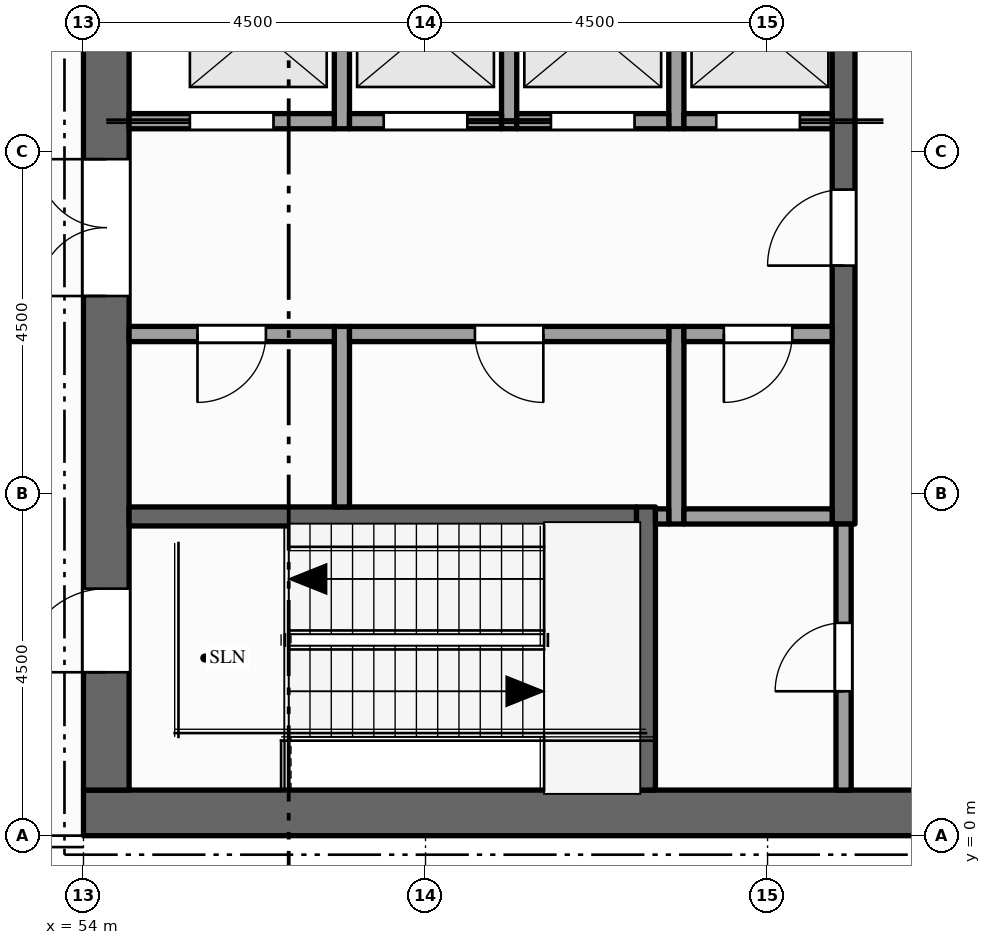
"""IFC4 building model, lengths in metres.
Left out: names, types, materials, properties, quantities, classifications, styles, units other than length and angle.
Written with IfcOpenShell. Run it as: python <this file> out.ifc"""

import sys

from ifc_helpers import new_model, si_unit, direction, frame, frame_2d, origin, place, context, subcontext, project, spatial, rectangle, extrude, element, fill, save


model = new_model("IFC4")
c1 = context("Model", 3, precision=1e-05, world=origin(), true_north=direction((0.0, 1.0)))
c2 = subcontext(c1, "Body", "Model", "MODEL_VIEW")
j1 = project(units=[si_unit("LENGTHUNIT", "METRE"), si_unit("PLANEANGLEUNIT", "RADIAN")], contexts=[c1])
p1 = place(None, origin())
s1 = spatial("IfcSite", under=j1, at=p1, CompositionType="ELEMENT")
p2 = place(p1, origin())
s2 = spatial("IfcBuilding", under=s1, at=p2, CompositionType="ELEMENT")
p3 = place(p2, frame((0.0, 0.0, 318.5)))
s3 = spatial("IfcBuildingStorey", under=s2, at=p3, CompositionType="ELEMENT", Elevation=318.5)
p4 = place(p3, frame((67.5, 0.3, -0.15), z_axis=(0.0, 0.0, 1.0), x_axis=(-1.0, 0.0, 0.0)))
e1 = element("IfcWall", 1, at=p4, inside=s3, PredefinedType="SHEAR", context=c2, shape_type="SweptSolid", body=[
    extrude(rectangle(XDim=13.5, YDim=0.6, at=frame_2d((6.75, 0.0))), origin(), (0.0, 0.0, 1.0), 4.5),
])
p5 = place(p3, frame((54.3, 0.6, -0.15), z_axis=(0.0, 0.0, 1.0), x_axis=(0.0, 1.0, 0.0)))
e2 = element("IfcWall", 2, at=p5, inside=s3, PredefinedType="SHEAR", context=c2, shape_type="SweptSolid", body=[
    extrude(rectangle(XDim=21.3, YDim=0.6, at=frame_2d((10.65, 0.0))), origin(), (0.0, 0.0, 1.0), 4.5),
])
p6 = place(p5, frame((6.5, 0.0, 0.15)))
e3 = element("IfcOpeningElement", 3, at=p6, cuts=e2, PredefinedType="OPENING", context=c2, shape_type="SweptSolid", body=[
    extrude(rectangle(XDim=1.8, YDim=2.1, at=frame_2d((0.9, 1.05))), frame((0.0, 0.31, 0.0), z_axis=(0.0, -1.0, 0.0), x_axis=(1.0, 0.0, 0.0)), (0.0, 0.0, 1.0), 0.62),
])
p7 = place(p5, frame((12.55, 0.0, 0.15)))
e4 = element("IfcOpeningElement", 4, at=p7, cuts=e2, PredefinedType="OPENING", context=c2, shape_type="SweptSolid", body=[
    extrude(rectangle(XDim=1.1, YDim=2.1, at=frame_2d((0.55, 1.05))), frame((0.0, 0.31, 0.0), z_axis=(0.0, -1.0, 0.0), x_axis=(1.0, 0.0, 0.0)), (0.0, 0.0, 1.0), 0.62),
])
p8 = place(p5, frame((1.55, 0.0, 0.15)))
e5 = element("IfcOpeningElement", 5, at=p8, cuts=e2, PredefinedType="OPENING", context=c2, shape_type="SweptSolid", body=[
    extrude(rectangle(XDim=1.1, YDim=2.1, at=frame_2d((0.55, 1.05))), frame((0.0, 0.31, 0.0), z_axis=(0.0, -1.0, 0.0), x_axis=(1.0, 0.0, 0.0)), (0.0, 0.0, 1.0), 0.62),
])
p9 = place(p5, frame((18.75, 0.0, 0.15)))
e6 = element("IfcOpeningElement", 6, at=p9, cuts=e2, PredefinedType="OPENING", context=c2, shape_type="SweptSolid", body=[
    extrude(rectangle(XDim=1.1, YDim=2.1, at=frame_2d((0.55, 1.05))), frame((0.0, 0.31, 0.0), z_axis=(0.0, -1.0, 0.0), x_axis=(1.0, 0.0, 0.0)), (0.0, 0.0, 1.0), 0.62),
])
p10 = place(p3, frame((57.4, 4.325, 0.0), z_axis=(0.0, 0.0, 1.0), x_axis=(0.0, 1.0, 0.0)))
e7 = element("IfcWall", 7, at=p10, inside=s3, PredefinedType="PARTITIONING", context=c2, shape_type="SweptSolid", body=[
    extrude(rectangle(XDim=2.375, YDim=0.2, at=frame_2d((1.188, 0.0))), origin(), (0.0, 0.0, 1.0), 4.35),
])
for number, where, z_axis, x_axis in (
    (8, (57.4, 9.3, 0.0), (0.0, 0.0, 1.0), (0.0, 1.0, 0.0)),
    (9, (59.6, 9.3, 0.0), (0.0, 0.0, 1.0), (0.0, 1.0, 0.0)),
):
    element("IfcWall", number, at=place(p3, frame(where, z_axis=z_axis, x_axis=x_axis)), inside=s3, PredefinedType="SOLIDWALL", context=c2, shape_type="SweptSolid", body=[
        extrude(rectangle(XDim=2.6, YDim=0.2, at=frame_2d((1.3, 0.0))), origin(), (0.0, 0.0, 1.0), 4.35),
    ])
p11 = place(p3, frame((61.4, 0.6, 0.0), z_axis=(0.0, 0.0, 1.0), x_axis=(0.0, 1.0, 0.0)))
e10 = element("IfcWall", 10, at=p11, inside=s3, PredefinedType="SHEAR", context=c2, shape_type="SweptSolid", body=[
    extrude(rectangle(XDim=3.725, YDim=0.25, at=frame_2d((1.862, 0.0))), origin(), (0.0, 0.0, 1.0), 4.35),
])
p12 = place(p3, frame((61.8, 4.1, 0.0), z_axis=(0.0, 0.0, 1.0), x_axis=(0.0, 1.0, 0.0)))
e11 = element("IfcWall", 11, at=p12, inside=s3, PredefinedType="PARTITIONING", context=c2, shape_type="SweptSolid", body=[
    extrude(rectangle(XDim=2.6, YDim=0.2, at=frame_2d((1.3, 0.0))), origin(), (0.0, 0.0, 1.0), 4.35),
])
p13 = place(p3, frame((61.8, 9.3, 0.0), z_axis=(0.0, 0.0, 1.0), x_axis=(0.0, 1.0, 0.0)))
e12 = element("IfcWall", 12, at=p13, inside=s3, PredefinedType="SOLIDWALL", context=c2, shape_type="SweptSolid", body=[
    extrude(rectangle(XDim=2.6, YDim=0.2, at=frame_2d((1.3, 0.0))), origin(), (0.0, 0.0, 1.0), 4.35),
])
p14 = place(p3, frame((64.0, 0.6, 0.0), z_axis=(0.0, 0.0, 1.0), x_axis=(0.0, 1.0, 0.0)))
e13 = element("IfcWall", 13, at=p14, inside=s3, PredefinedType="PARTITIONING", context=c2, shape_type="SweptSolid", body=[
    extrude(rectangle(XDim=3.5, YDim=0.2, at=frame_2d((1.75, 0.0))), origin(), (0.0, 0.0, 1.0), 4.35),
])
p15 = place(p14, frame((1.3, 0.0, 0.0)))
e14 = element("IfcOpeningElement", 14, at=p15, cuts=e13, PredefinedType="OPENING", context=c2, shape_type="SweptSolid", body=[
    extrude(rectangle(XDim=0.9, YDim=2.1, at=frame_2d((0.45, 1.05))), frame((0.0, 0.11, 0.0), z_axis=(0.0, -1.0, 0.0), x_axis=(1.0, 0.0, 0.0)), (0.0, 0.0, 1.0), 0.22),
])
p16 = place(p3, frame((64.0, 4.1, 0.0), z_axis=(0.0, 0.0, 1.0), x_axis=(0.0, 1.0, 0.0)))
e15 = element("IfcWall", 15, at=p16, inside=s3, PredefinedType="SHEAR", context=c2, shape_type="SweptSolid", body=[
    extrude(rectangle(XDim=14.5, YDim=0.3, at=frame_2d((7.25, 0.0))), origin(), (0.0, 0.0, 1.0), 4.35),
])
p17 = place(p16, frame((3.4, 0.0, 0.0)))
e16 = element("IfcOpeningElement", 16, at=p17, cuts=e15, PredefinedType="OPENING", context=c2, shape_type="SweptSolid", body=[
    extrude(rectangle(XDim=1.0, YDim=2.1, at=frame_2d((0.5, 1.05))), frame((0.0, 0.16, 0.0), z_axis=(0.0, -1.0, 0.0), x_axis=(1.0, 0.0, 0.0)), (0.0, 0.0, 1.0), 0.32),
])
p18 = place(p16, frame((9.1, 0.0, 0.0)))
e17 = element("IfcOpeningElement", 17, at=p18, cuts=e15, PredefinedType="OPENING", context=c2, shape_type="SweptSolid", body=[
    extrude(rectangle(XDim=1.0, YDim=2.1, at=frame_2d((0.5, 1.05))), frame((0.0, 0.16, 0.0), z_axis=(0.0, -1.0, 0.0), x_axis=(1.0, 0.0, 0.0)), (0.0, 0.0, 1.0), 0.32),
])
p19 = place(p3, frame((54.6, 4.2, 0.0), z_axis=(0.0, 0.0, 1.0), x_axis=(1.0, 0.0, 0.0)))
e18 = element("IfcWall", 18, at=p19, inside=s3, PredefinedType="SHEAR", context=c2, shape_type="SweptSolid", body=[
    extrude(rectangle(XDim=6.675, YDim=0.25, at=frame_2d((3.337, 0.0))), origin(), (0.0, 0.0, 1.0), 4.35),
])
p20 = place(p3, frame((61.525, 4.2, 0.0), z_axis=(0.0, 0.0, 1.0), x_axis=(1.0, 0.0, 0.0)))
e19 = element("IfcWall", 19, at=p20, inside=s3, PredefinedType="PARTITIONING", context=c2, shape_type="SweptSolid", body=[
    extrude(rectangle(XDim=0.175, YDim=0.2, at=frame_2d((0.087, 0.0))), origin(), (0.0, 0.0, 1.0), 4.35),
])
p21 = place(p3, frame((61.9, 4.2, 0.0), z_axis=(0.0, 0.0, 1.0), x_axis=(1.0, 0.0, 0.0)))
e20 = element("IfcWall", 20, at=p21, inside=s3, PredefinedType="PARTITIONING", context=c2, shape_type="SweptSolid", body=[
    extrude(rectangle(XDim=1.95, YDim=0.2, at=frame_2d((0.975, 0.0))), origin(), (0.0, 0.0, 1.0), 4.35),
])
p22 = place(p3, frame((54.6, 6.6, 0.0), z_axis=(0.0, 0.0, 1.0), x_axis=(1.0, 0.0, 0.0)))
e21 = element("IfcWall", 21, at=p22, inside=s3, PredefinedType="PARTITIONING", context=c2, shape_type="SweptSolid", body=[
    extrude(rectangle(XDim=2.7, YDim=0.2, at=frame_2d((1.35, 0.0))), origin(), (0.0, 0.0, 1.0), 4.35),
])
p23 = place(p22, frame((0.9, 0.0, 0.0)))
e22 = element("IfcOpeningElement", 22, at=p23, cuts=e21, PredefinedType="OPENING", context=c2, shape_type="SweptSolid", body=[
    extrude(rectangle(XDim=0.9, YDim=2.1, at=frame_2d((0.45, 1.05))), frame((0.0, 0.11, 0.0), z_axis=(0.0, -1.0, 0.0), x_axis=(1.0, 0.0, 0.0)), (0.0, 0.0, 1.0), 0.22),
])
p24 = place(p3, frame((57.5, 6.6, 0.0), z_axis=(0.0, 0.0, 1.0), x_axis=(1.0, 0.0, 0.0)))
e23 = element("IfcWall", 23, at=p24, inside=s3, PredefinedType="PARTITIONING", context=c2, shape_type="SweptSolid", body=[
    extrude(rectangle(XDim=4.2, YDim=0.2, at=frame_2d((2.1, 0.0))), origin(), (0.0, 0.0, 1.0), 4.35),
])
p25 = place(p24, frame((1.65, 0.0, 0.0)))
e24 = element("IfcOpeningElement", 24, at=p25, cuts=e23, PredefinedType="OPENING", context=c2, shape_type="SweptSolid", body=[
    extrude(rectangle(XDim=0.9, YDim=2.1, at=frame_2d((0.45, 1.05))), frame((0.0, 0.11, 0.0), z_axis=(0.0, -1.0, 0.0), x_axis=(1.0, 0.0, 0.0)), (0.0, 0.0, 1.0), 0.22),
])
p26 = place(p3, frame((61.9, 6.6, 0.0), z_axis=(0.0, 0.0, 1.0), x_axis=(1.0, 0.0, 0.0)))
e25 = element("IfcWall", 25, at=p26, inside=s3, PredefinedType="PARTITIONING", context=c2, shape_type="SweptSolid", body=[
    extrude(rectangle(XDim=1.95, YDim=0.2, at=frame_2d((0.975, 0.0))), origin(), (0.0, 0.0, 1.0), 4.35),
])
p27 = place(p26, frame((0.525, 0.0, 0.0)))
e26 = element("IfcOpeningElement", 26, at=p27, cuts=e25, PredefinedType="OPENING", context=c2, shape_type="SweptSolid", body=[
    extrude(rectangle(XDim=0.9, YDim=2.1, at=frame_2d((0.45, 1.05))), frame((0.0, 0.11, 0.0), z_axis=(0.0, -1.0, 0.0), x_axis=(1.0, 0.0, 0.0)), (0.0, 0.0, 1.0), 0.22),
])
p28 = place(p3, frame((54.6, 9.4, 0.0), z_axis=(0.0, 0.0, 1.0), x_axis=(1.0, 0.0, 0.0)))
e27 = element("IfcWall", 27, at=p28, inside=s3, PredefinedType="SOLIDWALL", context=c2, shape_type="SweptSolid", body=[
    extrude(rectangle(XDim=2.7, YDim=0.2, at=frame_2d((1.35, 0.0))), origin(), (0.0, 0.0, 1.0), 4.35),
])
p29 = place(p28, frame((0.8, 0.0, 0.012)))
e28 = element("IfcOpeningElement", 28, at=p29, cuts=e27, PredefinedType="OPENING", context=c2, shape_type="SweptSolid", body=[
    extrude(rectangle(XDim=1.1, YDim=2.1, at=frame_2d((0.55, 1.05))), frame((0.0, 0.11, 0.0), z_axis=(0.0, -1.0, 0.0), x_axis=(1.0, 0.0, 0.0)), (0.0, 0.0, 1.0), 0.22),
])
p30 = place(p3, frame((57.5, 9.4, 0.0), z_axis=(0.0, 0.0, 1.0), x_axis=(1.0, 0.0, 0.0)))
e29 = element("IfcWall", 29, at=p30, inside=s3, PredefinedType="SOLIDWALL", context=c2, shape_type="SweptSolid", body=[
    extrude(rectangle(XDim=2.0, YDim=0.2, at=frame_2d((1.0, 0.0))), origin(), (0.0, 0.0, 1.0), 4.35),
])
p31 = place(p30, frame((0.45, 0.0, 0.012)))
e30 = element("IfcOpeningElement", 30, at=p31, cuts=e29, PredefinedType="OPENING", context=c2, shape_type="SweptSolid", body=[
    extrude(rectangle(XDim=1.1, YDim=2.1, at=frame_2d((0.55, 1.05))), frame((0.0, 0.11, 0.0), z_axis=(0.0, -1.0, 0.0), x_axis=(1.0, 0.0, 0.0)), (0.0, 0.0, 1.0), 0.22),
])
p32 = place(p3, frame((59.7, 9.4, 0.0), z_axis=(0.0, 0.0, 1.0), x_axis=(1.0, 0.0, 0.0)))
e31 = element("IfcWall", 31, at=p32, inside=s3, PredefinedType="SOLIDWALL", context=c2, shape_type="SweptSolid", body=[
    extrude(rectangle(XDim=2.0, YDim=0.2, at=frame_2d((1.0, 0.0))), origin(), (0.0, 0.0, 1.0), 4.35),
])
p33 = place(p32, frame((0.45, 0.0, 0.012)))
e32 = element("IfcOpeningElement", 32, at=p33, cuts=e31, PredefinedType="OPENING", context=c2, shape_type="SweptSolid", body=[
    extrude(rectangle(XDim=1.1, YDim=2.1, at=frame_2d((0.55, 1.05))), frame((0.0, 0.11, 0.0), z_axis=(0.0, -1.0, 0.0), x_axis=(1.0, 0.0, 0.0)), (0.0, 0.0, 1.0), 0.22),
])
p34 = place(p3, frame((61.9, 9.4, 0.0), z_axis=(0.0, 0.0, 1.0), x_axis=(1.0, 0.0, 0.0)))
e33 = element("IfcWall", 33, at=p34, inside=s3, PredefinedType="SOLIDWALL", context=c2, shape_type="SweptSolid", body=[
    extrude(rectangle(XDim=1.95, YDim=0.2, at=frame_2d((0.975, 0.0))), origin(), (0.0, 0.0, 1.0), 4.35),
])
p35 = place(p34, frame((0.425, 0.0, 0.012)))
e34 = element("IfcOpeningElement", 34, at=p35, cuts=e33, PredefinedType="OPENING", context=c2, shape_type="SweptSolid", body=[
    extrude(rectangle(XDim=1.1, YDim=2.1, at=frame_2d((0.55, 1.05))), frame((0.0, 0.11, 0.0), z_axis=(0.0, -1.0, 0.0), x_axis=(1.0, 0.0, 0.0)), (0.0, 0.0, 1.0), 0.22),
])
p36 = place(p29, origin())
e35 = element("IfcDoor", 35, at=p36, inside=s3, OperationType="SLIDING_TO_LEFT", PredefinedType="DOOR", context=c2, shape_type="SweptSolid", body=[
    extrude(rectangle(XDim=1.1, YDim=2.1, at=frame_2d((0.55, 1.05))), frame((0.0, 0.025, 0.0), z_axis=(0.0, -1.0, 0.0), x_axis=(1.0, 0.0, 0.0)), (0.0, 0.0, 1.0), 0.05),
])
fill(e28, e35)
p37 = place(p31, origin())
e36 = element("IfcDoor", 36, at=p37, inside=s3, OperationType="SLIDING_TO_RIGHT", PredefinedType="DOOR", context=c2, shape_type="SweptSolid", body=[
    extrude(rectangle(XDim=1.1, YDim=2.1, at=frame_2d((0.55, 1.05))), frame((0.0, 0.025, 0.0), z_axis=(0.0, -1.0, 0.0), x_axis=(1.0, 0.0, 0.0)), (0.0, 0.0, 1.0), 0.05),
])
fill(e30, e36)
p38 = place(p33, origin())
e37 = element("IfcDoor", 37, at=p38, inside=s3, OperationType="SLIDING_TO_LEFT", PredefinedType="DOOR", context=c2, shape_type="SweptSolid", body=[
    extrude(rectangle(XDim=1.1, YDim=2.1, at=frame_2d((0.55, 1.05))), frame((0.0, 0.025, 0.0), z_axis=(0.0, -1.0, 0.0), x_axis=(1.0, 0.0, 0.0)), (0.0, 0.0, 1.0), 0.05),
])
fill(e32, e37)
p39 = place(p35, origin())
e38 = element("IfcDoor", 38, at=p39, inside=s3, OperationType="SLIDING_TO_RIGHT", PredefinedType="DOOR", context=c2, shape_type="SweptSolid", body=[
    extrude(rectangle(XDim=1.1, YDim=2.1, at=frame_2d((0.55, 1.05))), frame((0.0, 0.025, 0.0), z_axis=(0.0, -1.0, 0.0), x_axis=(1.0, 0.0, 0.0)), (0.0, 0.0, 1.0), 0.05),
])
fill(e34, e38)
p40 = place(p6, origin())
e39 = element("IfcDoor", 39, at=p40, inside=s3, OperationType="DOUBLE_DOOR_SINGLE_SWING", PredefinedType="DOOR", context=c2, shape_type="SweptSolid", body=[
    extrude(rectangle(XDim=1.8, YDim=2.1, at=frame_2d((0.9, 1.05))), frame((0.0, 0.025, 0.0), z_axis=(0.0, -1.0, 0.0), x_axis=(1.0, 0.0, 0.0)), (0.0, 0.0, 1.0), 0.05),
])
fill(e3, e39)
p41 = place(p17, origin())
e40 = element("IfcDoor", 40, at=p41, inside=s3, OperationType="SINGLE_SWING_LEFT", PredefinedType="DOOR", context=c2, shape_type="SweptSolid", body=[
    extrude(rectangle(XDim=1.0, YDim=2.1, at=frame_2d((0.5, 1.05))), frame((0.0, 0.025, 0.0), z_axis=(0.0, -1.0, 0.0), x_axis=(1.0, 0.0, 0.0)), (0.0, 0.0, 1.0), 0.05),
])
fill(e16, e40)
p42 = place(p8, origin())
e41 = element("IfcDoor", 41, at=p42, inside=s3, OperationType="SINGLE_SWING_LEFT", PredefinedType="DOOR", context=c2, shape_type="SweptSolid", body=[
    extrude(rectangle(XDim=1.1, YDim=2.1, at=frame_2d((0.55, 1.05))), frame((0.0, 0.025, 0.0), z_axis=(0.0, -1.0, 0.0), x_axis=(1.0, 0.0, 0.0)), (0.0, 0.0, 1.0), 0.05),
])
fill(e5, e41)
p43 = place(p15, origin())
e42 = element("IfcDoor", 42, at=p43, inside=s3, OperationType="SINGLE_SWING_LEFT", PredefinedType="DOOR", context=c2, shape_type="SweptSolid", body=[
    extrude(rectangle(XDim=0.9, YDim=2.1, at=frame_2d((0.45, 1.05))), frame((0.0, 0.025, 0.0), z_axis=(0.0, -1.0, 0.0), x_axis=(1.0, 0.0, 0.0)), (0.0, 0.0, 1.0), 0.05),
])
fill(e14, e42)
p44 = place(p23, origin())
e43 = element("IfcDoor", 43, at=p44, inside=s3, OperationType="SINGLE_SWING_LEFT", PredefinedType="DOOR", context=c2, shape_type="SweptSolid", body=[
    extrude(rectangle(XDim=0.9, YDim=2.1, at=frame_2d((0.45, 1.05))), frame((0.0, 0.025, 0.0), z_axis=(0.0, -1.0, 0.0), x_axis=(1.0, 0.0, 0.0)), (0.0, 0.0, 1.0), 0.05),
])
fill(e22, e43)
p45 = place(p25, origin())
e44 = element("IfcDoor", 44, at=p45, inside=s3, OperationType="SINGLE_SWING_RIGHT", PredefinedType="DOOR", context=c2, shape_type="SweptSolid", body=[
    extrude(rectangle(XDim=0.9, YDim=2.1, at=frame_2d((0.45, 1.05))), frame((0.0, 0.025, 0.0), z_axis=(0.0, -1.0, 0.0), x_axis=(1.0, 0.0, 0.0)), (0.0, 0.0, 1.0), 0.05),
])
fill(e24, e44)
p46 = place(p27, origin())
e45 = element("IfcDoor", 45, at=p46, inside=s3, OperationType="SINGLE_SWING_LEFT", PredefinedType="DOOR", context=c2, shape_type="SweptSolid", body=[
    extrude(rectangle(XDim=0.9, YDim=2.1, at=frame_2d((0.45, 1.05))), frame((0.0, 0.025, 0.0), z_axis=(0.0, -1.0, 0.0), x_axis=(1.0, 0.0, 0.0)), (0.0, 0.0, 1.0), 0.05),
])
fill(e26, e45)
save(model, sys.argv[1])
